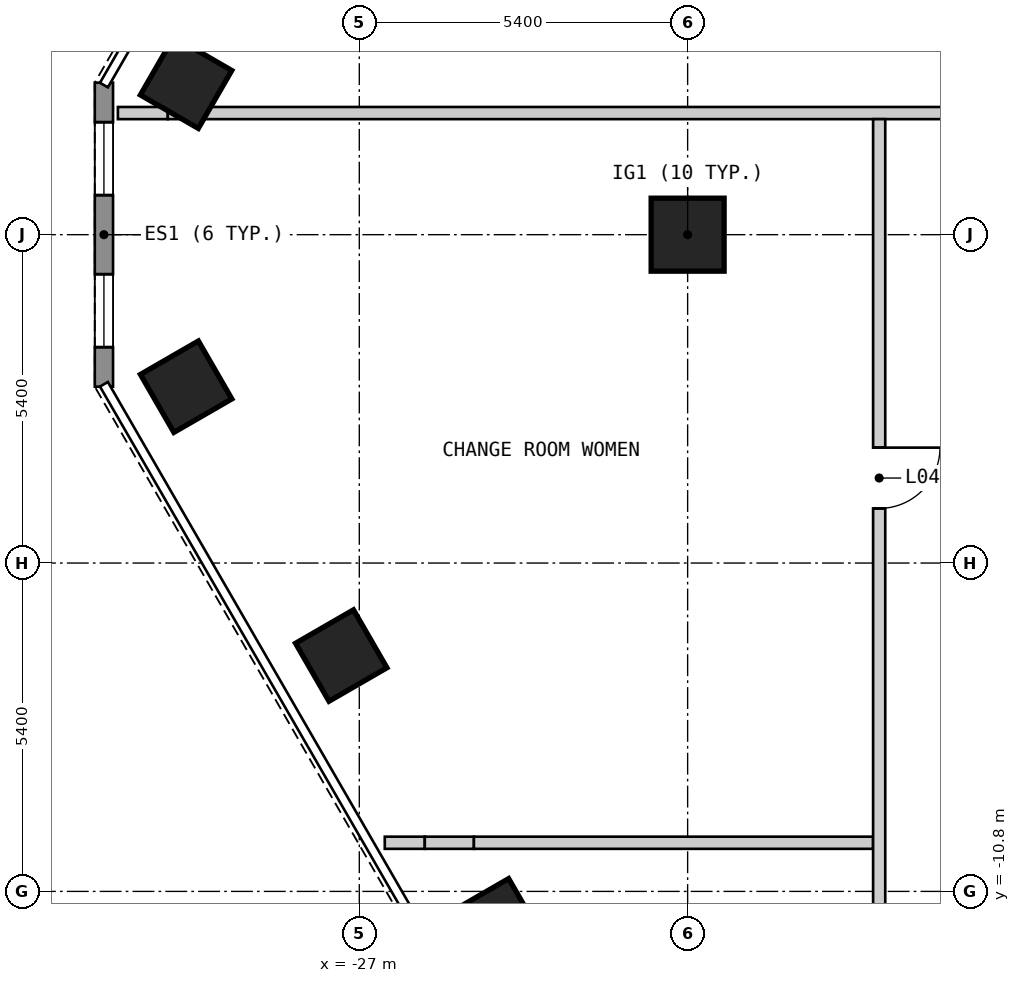
"""IFC4 building model, lengths in metres.
Left out: names, types, materials, properties, quantities, classifications, styles, units other than length and angle.
Written with IfcOpenShell. Run it as: python <this file> out.ifc"""

import sys

from ifc_helpers import new_model, si_unit, direction, frame, frame_2d, origin, origin_2d, place, context, subcontext, project, spatial, polyline, rectangle, outline, extrude, element, fill, save


model = new_model("IFC4")
c1 = context("Model", 3, precision=1e-05, world=origin(), true_north=direction((0.0, 1.0)))
c2 = subcontext(c1, "Body", "Model", "MODEL_VIEW")
j1 = project(units=[si_unit("LENGTHUNIT", "METRE"), si_unit("PLANEANGLEUNIT", "RADIAN")], contexts=[c1])
p1 = place(None, origin())
s1 = spatial("IfcSite", under=j1, at=p1, CompositionType="ELEMENT")
p2 = place(p1, origin())
s2 = spatial("IfcBuilding", under=s1, at=p2, CompositionType="ELEMENT")
p3 = place(p2, frame((0.0, 0.0, 16.2)))
s3 = spatial("IfcBuildingStorey", under=s2, at=p3, CompositionType="ELEMENT", Elevation=16.2)
for number, where, z_axis, x_axis in (
    (1, (-29.849, 2.499, 0.0), (0.0, 0.0, 1.0), (-0.5, -0.866, 0.0)),
    (2, (-29.848, -2.5, 0.0), (0.0, 0.0, 1.0), (0.5, -0.866, 0.0)),
    (3, (-27.297, -6.921, 0.0), (0.0, 0.0, 1.0), (0.5, -0.866, 0.0)),
    (4, (-24.745, -11.341, 0.0), (0.0, 0.0, 1.0), (0.5, -0.866, 0.0)),
):
    element("IfcColumn", number, at=place(p3, frame(where, z_axis=z_axis, x_axis=x_axis)), inside=s3, PredefinedType="COLUMN", context=c2, shape_type="SweptSolid", body=[
        extrude(rectangle(XDim=1.1, YDim=1.1, at=origin_2d()), origin(), (0.0, 0.0, 1.0), 3.6),
    ])
p4 = place(p3, frame((-21.6, 0.0, 0.0), z_axis=(0.0, 0.0, 1.0), x_axis=(1.0, 0.0, 0.0)))
e5 = element("IfcColumn", 5, at=p4, inside=s3, PredefinedType="COLUMN", context=c2, shape_type="SweptSolid", body=[
    extrude(rectangle(XDim=1.2, YDim=1.2, at=origin_2d()), origin(), (0.0, 0.0, 1.0), 3.6),
])
p5 = place(p3, frame((-31.2, 2.5, 0.0), z_axis=(0.0, 0.0, 1.0), x_axis=(0.0, -1.0, 0.0)))
e6 = element("IfcWall", 6, at=p5, inside=s3, PredefinedType="SOLIDWALL", context=c2, shape_type="SweptSolid", body=[
    extrude(outline(polyline([(0.0, -0.15), (5.0, -0.15), (4.92, 0.15), (0.08, 0.15), (0.0, -0.15)])), origin(), (0.0, 0.0, 1.0), 3.25),
])
p6 = place(p5, frame((0.65, 0.0, 0.15)))
e7 = element("IfcOpeningElement", 7, at=p6, cuts=e6, PredefinedType="OPENING", context=c2, shape_type="SweptSolid", body=[
    extrude(rectangle(XDim=1.2, YDim=2.1, at=frame_2d((0.6, 1.05))), frame((0.0, 0.16, 0.0), z_axis=(0.0, -1.0, 0.0), x_axis=(1.0, 0.0, 0.0)), (0.0, 0.0, 1.0), 0.32),
])
p7 = place(p5, frame((3.15, 0.0, 0.15)))
e8 = element("IfcOpeningElement", 8, at=p7, cuts=e6, PredefinedType="OPENING", context=c2, shape_type="SweptSolid", body=[
    extrude(rectangle(XDim=1.2, YDim=2.1, at=frame_2d((0.6, 1.05))), frame((0.0, 0.16, 0.0), z_axis=(0.0, -1.0, 0.0), x_axis=(1.0, 0.0, 0.0)), (0.0, 0.0, 1.0), 0.32),
])
p8 = place(p3, frame((-26.581, -10.0, 0.0), z_axis=(0.0, 0.0, 1.0), x_axis=(1.0, 0.0, 0.0)))
e9 = element("IfcWall", 9, at=p8, inside=s3, PredefinedType="PARTITIONING", context=c2, shape_type="SweptSolid", body=[
    extrude(rectangle(XDim=0.658, YDim=0.2, at=frame_2d((0.329, 0.0))), origin(), (0.0, 0.0, 1.0), 3.25),
])
p9 = place(p3, frame((-25.923, -10.0, 0.0), z_axis=(0.0, 0.0, 1.0), x_axis=(1.0, 0.0, 0.0)))
e10 = element("IfcWall", 10, at=p9, inside=s3, PredefinedType="PARTITIONING", context=c2, shape_type="SweptSolid", body=[
    extrude(rectangle(XDim=0.808, YDim=0.2, at=frame_2d((0.404, 0.0))), origin(), (0.0, 0.0, 1.0), 2.52),
])
p10 = place(p3, frame((-25.115, -10.0, 0.0), z_axis=(0.0, 0.0, 1.0), x_axis=(1.0, 0.0, 0.0)))
e11 = element("IfcWall", 11, at=p10, inside=s3, PredefinedType="PARTITIONING", context=c2, shape_type="SweptSolid", body=[
    extrude(rectangle(XDim=6.565, YDim=0.2, at=frame_2d((3.282, 0.0))), origin(), (0.0, 0.0, 1.0), 3.25),
])
p11 = place(p3, frame((-30.97, 2.0, 0.0), z_axis=(0.0, 0.0, 1.0), x_axis=(1.0, 0.0, 0.0)))
e12 = element("IfcWall", 12, at=p11, inside=s3, PredefinedType="PARTITIONING", context=c2, shape_type="SweptSolid", body=[
    extrude(rectangle(XDim=0.821, YDim=0.2, at=frame_2d((0.411, 0.0))), origin(), (0.0, 0.0, 1.0), 3.25),
])
p12 = place(p3, frame((-30.149, 2.0, 0.0), z_axis=(0.0, 0.0, 1.0), x_axis=(1.0, 0.0, 0.0)))
e13 = element("IfcWall", 13, at=p12, inside=s3, PredefinedType="PARTITIONING", context=c2, shape_type="SweptSolid", body=[
    extrude(rectangle(XDim=0.6, YDim=0.2, at=frame_2d((0.3, 0.0))), origin(), (0.0, 0.0, 1.0), 2.52),
])
p13 = place(p3, frame((-29.549, 2.0, 0.0), z_axis=(0.0, 0.0, 1.0), x_axis=(1.0, 0.0, 0.0)))
e14 = element("IfcWall", 14, at=p13, inside=s3, PredefinedType="PARTITIONING", context=c2, shape_type="SweptSolid", body=[
    extrude(rectangle(XDim=59.097, YDim=0.2, at=frame_2d((29.549, 0.0))), origin(), (0.0, 0.0, 1.0), 3.25),
])
p14 = place(p13, frame((21.517, 0.0, 0.0)))
e15 = element("IfcOpeningElement", 15, at=p14, cuts=e14, PredefinedType="OPENING", context=c2, shape_type="SweptSolid", body=[
    extrude(rectangle(XDim=1.8, YDim=2.1, at=frame_2d((0.9, 1.05))), frame((0.0, 0.11, 0.0), z_axis=(0.0, -1.0, 0.0), x_axis=(1.0, 0.0, 0.0)), (0.0, 0.0, 1.0), 0.22),
])
p15 = place(p13, frame((35.781, 0.0, 0.0)))
e16 = element("IfcOpeningElement", 16, at=p15, cuts=e14, PredefinedType="OPENING", context=c2, shape_type="SweptSolid", body=[
    extrude(rectangle(XDim=1.8, YDim=2.1, at=frame_2d((0.9, 1.05))), frame((0.0, 0.11, 0.0), z_axis=(0.0, -1.0, 0.0), x_axis=(1.0, 0.0, 0.0)), (0.0, 0.0, 1.0), 0.22),
])
p16 = place(p3, frame((-18.45, -21.471, 0.0), z_axis=(0.0, 0.0, 1.0), x_axis=(0.0, 1.0, 0.0)))
e17 = element("IfcWall", 17, at=p16, inside=s3, PredefinedType="PARTITIONING", context=c2, shape_type="SweptSolid", body=[
    extrude(rectangle(XDim=23.371, YDim=0.2, at=frame_2d((11.686, 0.0))), origin(), (0.0, 0.0, 1.0), 3.25),
])
p17 = place(p16, frame((5.373, 0.0, 0.0)))
e18 = element("IfcOpeningElement", 18, at=p17, cuts=e17, PredefinedType="OPENING", context=c2, shape_type="SweptSolid", body=[
    extrude(rectangle(XDim=1.0, YDim=2.1, at=frame_2d((0.5, 1.05))), frame((0.0, 0.11, 0.0), z_axis=(0.0, -1.0, 0.0), x_axis=(1.0, 0.0, 0.0)), (0.0, 0.0, 1.0), 0.22),
])
p18 = place(p16, frame((16.969, 0.0, 0.0)))
e19 = element("IfcOpeningElement", 19, at=p18, cuts=e17, PredefinedType="OPENING", context=c2, shape_type="SweptSolid", body=[
    extrude(rectangle(XDim=1.0, YDim=2.1, at=frame_2d((0.5, 1.05))), frame((0.0, 0.11, 0.0), z_axis=(0.0, -1.0, 0.0), x_axis=(1.0, 0.0, 0.0)), (0.0, 0.0, 1.0), 0.22),
])
p19 = place(p6, origin())
e20 = element("IfcWindow", 20, at=p19, inside=s3, PartitioningType="SINGLE_PANEL", PredefinedType="WINDOW", context=c2, shape_type="SweptSolid", body=[
    extrude(rectangle(XDim=1.2, YDim=2.1, at=frame_2d((0.6, 1.05))), frame((0.0, 0.03, 0.0), z_axis=(0.0, -1.0, 0.0), x_axis=(1.0, 0.0, 0.0)), (0.0, 0.0, 1.0), 0.06),
])
fill(e7, e20)
p20 = place(p7, origin())
e21 = element("IfcWindow", 21, at=p20, inside=s3, PartitioningType="SINGLE_PANEL", PredefinedType="WINDOW", context=c2, shape_type="SweptSolid", body=[
    extrude(rectangle(XDim=1.2, YDim=2.1, at=frame_2d((0.6, 1.05))), frame((0.0, 0.03, 0.0), z_axis=(0.0, -1.0, 0.0), x_axis=(1.0, 0.0, 0.0)), (0.0, 0.0, 1.0), 0.06),
])
fill(e8, e21)
p21 = place(p18, origin())
e22 = element("IfcDoor", 22, at=p21, inside=s3, OperationType="SINGLE_SWING_RIGHT", PredefinedType="DOOR", context=c2, shape_type="SweptSolid", body=[
    extrude(rectangle(XDim=1.0, YDim=2.1, at=frame_2d((0.5, 1.05))), frame((0.0, 0.025, 0.0), z_axis=(0.0, -1.0, 0.0), x_axis=(1.0, 0.0, 0.0)), (0.0, 0.0, 1.0), 0.05),
])
fill(e19, e22)
save(model, sys.argv[1])
